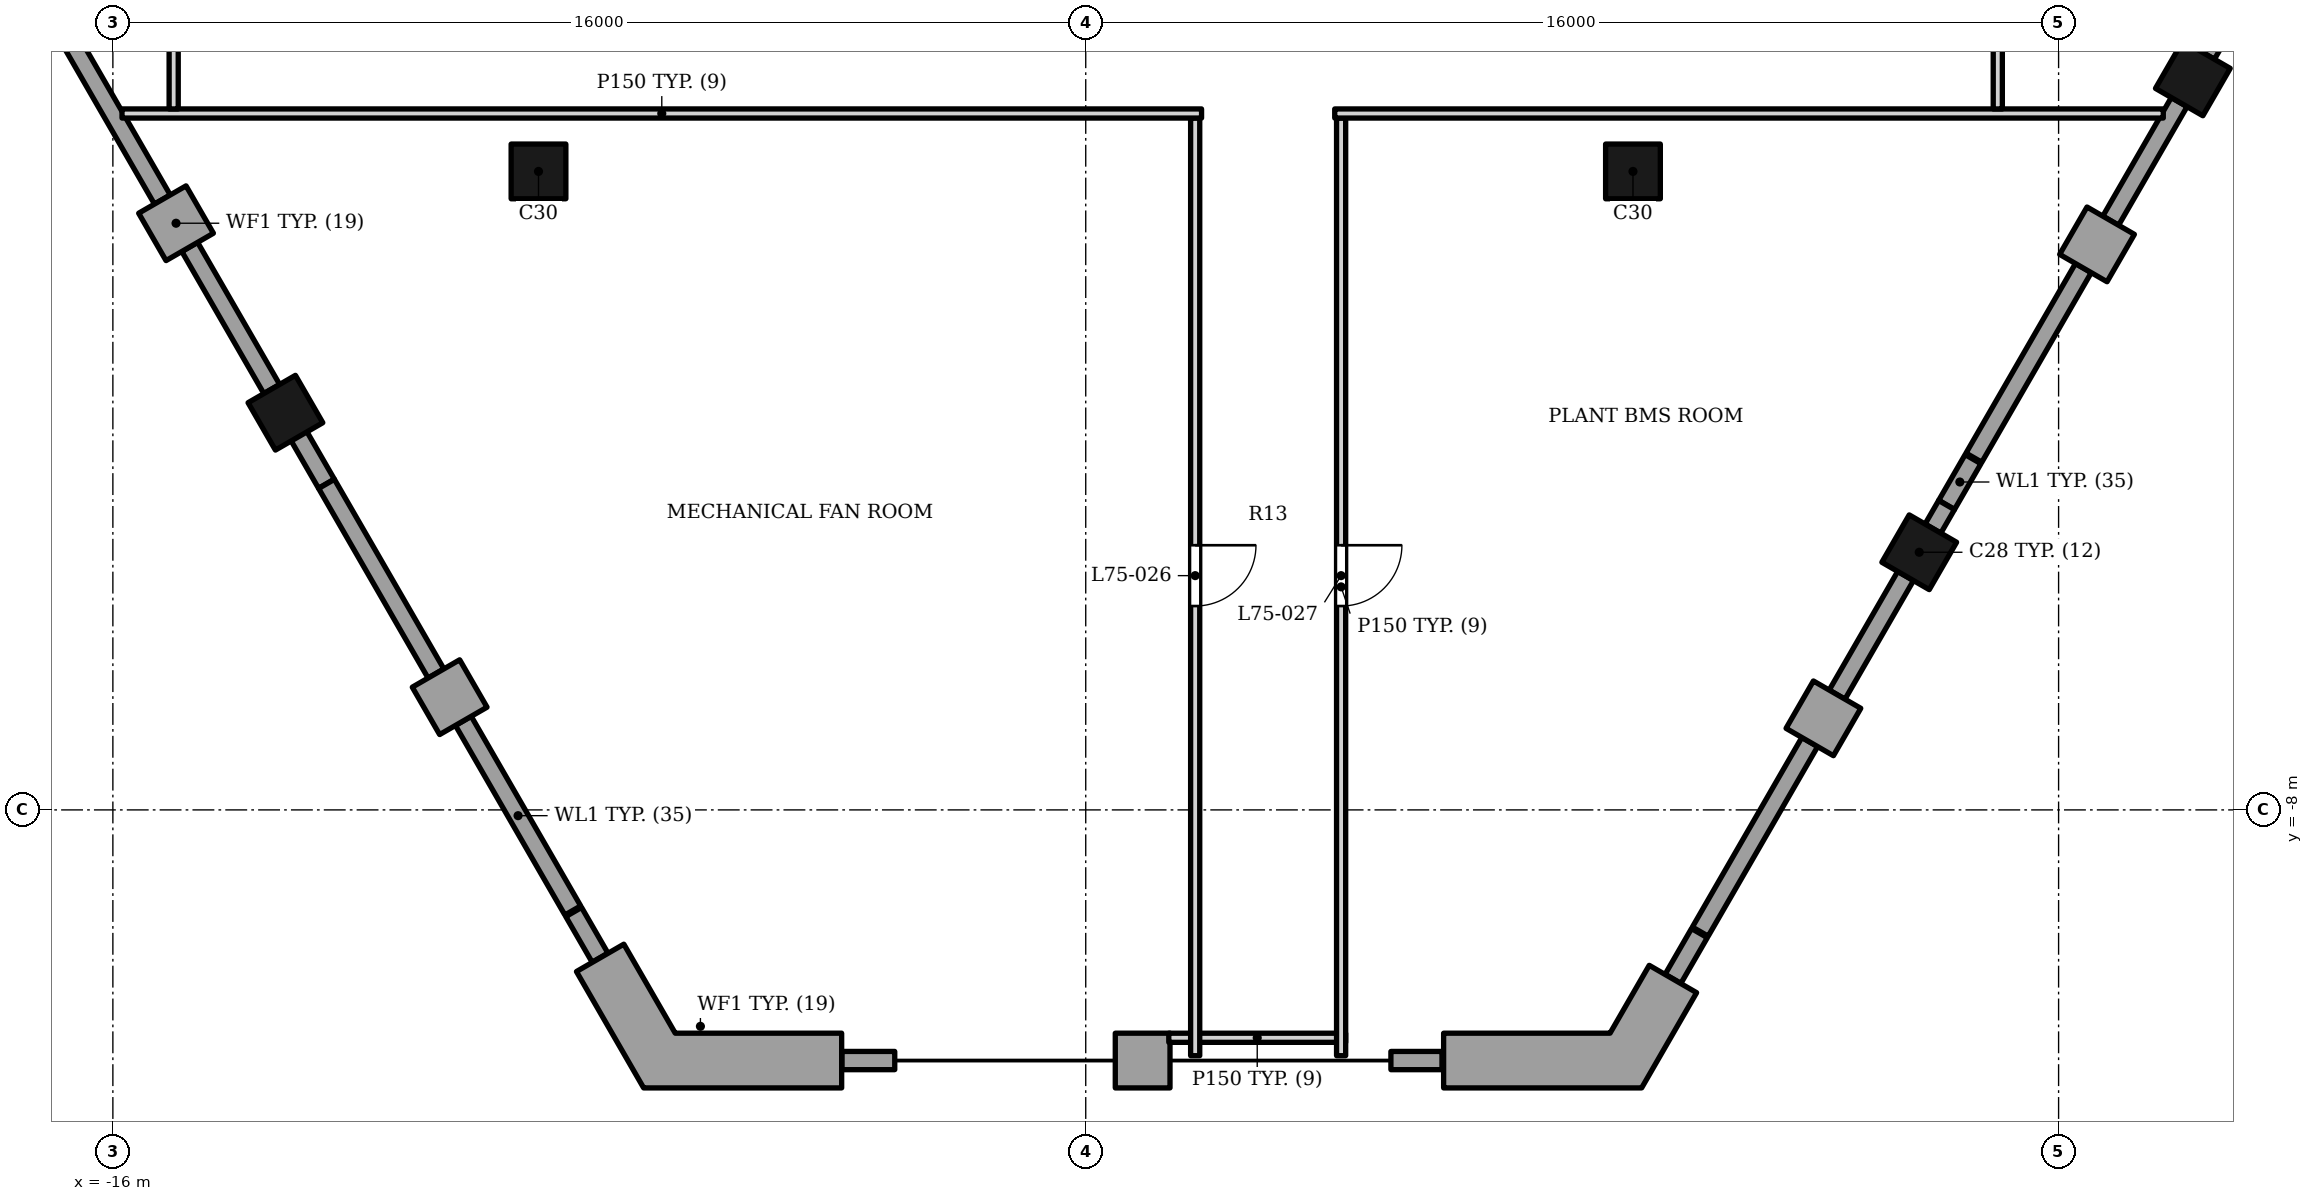
"""IFC4 building model, lengths in metres.
Left out: names, types, materials, properties, quantities, classifications, styles, units other than length and angle.
Written with IfcOpenShell. Run it as: python <this file> out.ifc"""

import sys

from ifc_helpers import new_model, si_unit, direction, frame, frame_2d, origin, origin_2d, place, context, subcontext, project, spatial, polyline, rectangle, outline, extrude, element, fill, save


model = new_model("IFC4")
c1 = context("Model", 3, precision=1e-05, world=origin(), true_north=direction((0.0, 1.0)))
c2 = subcontext(c1, "Body", "Model", "MODEL_VIEW")
j1 = project(units=[si_unit("LENGTHUNIT", "METRE"), si_unit("PLANEANGLEUNIT", "RADIAN")], contexts=[c1])
p1 = place(None, origin())
s1 = spatial("IfcSite", under=j1, at=p1, CompositionType="ELEMENT")
p2 = place(p1, origin())
s2 = spatial("IfcBuilding", under=s1, at=p2, CompositionType="ELEMENT")
p3 = place(p2, frame((0.0, 0.0, 320.5)))
s3 = spatial("IfcBuildingStorey", under=s2, at=p3, CompositionType="ELEMENT", Elevation=320.5)
for number, where, z_axis, x_axis in (
    (1, (-9.0, 2.5, 0.0), (0.0, 0.0, 1.0), (1.0, 0.0, 0.0)),
    (2, (9.0, 2.5, 0.0), (0.0, 0.0, 1.0), (1.0, 0.0, 0.0)),
    (3, (-13.162, -1.468, 0.0), (0.0, 0.0, 1.0), (0.5, -0.866, 0.0)),
    (4, (13.708, -3.763, 0.0), (0.0, 0.0, 1.0), (0.5, 0.866, 0.0)),
    (5, (18.208, 4.03, 0.0), (0.0, 0.0, 1.0), (0.5, 0.866, 0.0)),
):
    element("IfcColumn", number, at=place(p3, frame(where, z_axis=z_axis, x_axis=x_axis)), inside=s3, PredefinedType="COLUMN", context=c2, shape_type="SweptSolid", body=[
        extrude(rectangle(XDim=0.9, YDim=0.9, at=origin_2d()), origin(), (0.0, 0.0, 1.0), 5.0),
    ])
for number, where, z_axis, x_axis in (
    (6, (-15.351, 1.423, 0.0), (0.0, 0.0, 1.0), (0.866, 0.5, 0.0)),
    (7, (-10.851, -6.371, 0.0), (0.0, 0.0, 1.0), (0.866, 0.5, 0.0)),
):
    element("IfcWall", number, at=place(p3, frame(where, z_axis=z_axis, x_axis=x_axis)), inside=s3, PredefinedType="SOLIDWALL", context=c2, shape_type="SweptSolid", body=[
        extrude(rectangle(XDim=0.9, YDim=0.9, at=frame_2d((0.45, 0.0))), origin(), (0.0, 0.0, 1.0), 3.8),
    ])
p4 = place(p3, frame((-16.986, 5.156, 0.0), z_axis=(0.0, 0.0, 1.0), x_axis=(0.499982693035, -0.866035395735, 0.0)))
e8 = element("IfcWall", 8, at=p4, inside=s3, PredefinedType="ELEMENTEDWALL", context=c2, shape_type="SweptSolid", body=[
    extrude(rectangle(XDim=3.6, YDim=0.3, at=frame_2d((1.8, 0.0))), origin(), (0.0, 0.0, 1.0), 3.8),
])
p5 = place(p3, origin())
e9 = element("IfcWall", 9, at=p5, inside=s3, PredefinedType="ELEMENTEDWALL", context=c2, shape_type="SweptSolid", body=[
    extrude(outline(polyline([(-14.866, 1.183), (-13.517, -1.153), (-13.257, -1.003), (-14.606, 1.333), (-14.866, 1.183)])), origin(), (0.0, 0.0, 1.0), 3.8),
])
for number, where, z_axis, x_axis in (
    (10, (-12.486, -2.639, 0.0), (0.0, 0.0, 1.0), (0.5, -0.866, 0.0)),
    (11, (-10.236, -6.536, 0.0), (0.0, 0.0, 1.0), (0.5, -0.866, 0.0)),
):
    element("IfcWall", number, at=place(p3, frame(where, z_axis=z_axis, x_axis=x_axis)), inside=s3, PredefinedType="ELEMENTEDWALL", context=c2, shape_type="SweptSolid", body=[
        extrude(rectangle(XDim=3.6, YDim=0.3, at=frame_2d((1.8, 0.0))), origin(), (0.0, 0.0, 1.0), 3.8),
    ])
p6 = place(p3, origin())
e12 = element("IfcWall", 12, at=p6, inside=s3, PredefinedType="SOLIDWALL", context=c2, shape_type="SweptSolid", body=[
    extrude(outline(polyline([(1.386, -11.672), (0.486, -11.672), (0.486, -12.572), (1.386, -12.572), (1.386, -11.672)])), origin(), (0.0, 0.0, 1.0), 3.297),
])
for number, where, z_axis, x_axis in (
    (13, (11.907, -6.884, 0.0), (0.0, 0.0, 1.0), (0.5, 0.866, 0.0)),
    (14, (16.407, 0.91, 0.0), (0.0, 0.0, 1.0), (0.5, 0.866, 0.0)),
):
    element("IfcWall", number, at=place(p3, frame(where, z_axis=z_axis, x_axis=x_axis)), inside=s3, PredefinedType="SOLIDWALL", context=c2, shape_type="SweptSolid", body=[
        extrude(rectangle(XDim=0.9, YDim=0.9, at=frame_2d((0.45, 0.0))), origin(), (0.0, 0.0, 1.0), 3.8),
    ])
p7 = place(p3, frame((10.107, -10.001, 0.0), z_axis=(0.0, 0.0, 1.0), x_axis=(0.500012057535, 0.866018442252, 0.0)))
e15 = element("IfcWall", 15, at=p7, inside=s3, PredefinedType="ELEMENTEDWALL", context=c2, shape_type="SweptSolid", body=[
    extrude(rectangle(XDim=3.6, YDim=0.3, at=frame_2d((1.8, 0.0))), origin(), (0.0, 0.0, 1.0), 3.8),
])
p8 = place(p3, origin())
e16 = element("IfcWall", 16, at=p8, inside=s3, PredefinedType="ELEMENTEDWALL", context=c2, shape_type="SweptSolid", body=[
    extrude(outline(polyline([(12.487, -6.179), (13.614, -4.228), (13.354, -4.078), (12.227, -6.029), (12.487, -6.179)])), origin(), (0.0, 0.0, 1.0), 3.8),
])
p9 = place(p3, origin())
e17 = element("IfcWall", 17, at=p9, inside=s3, PredefinedType="ELEMENTEDWALL", context=c2, shape_type="SweptSolid", body=[
    extrude(outline(polyline([(14.027, -2.912), (13.804, -3.299), (14.063, -3.449), (14.287, -3.062), (14.027, -2.912)])), origin(), (0.0, 0.0, 1.0), 3.8),
])
p10 = place(p3, frame((14.607, -2.207, 0.0), z_axis=(0.0, 0.0, 1.0), x_axis=(0.500012057535, 0.866018442252, 0.0)))
e18 = element("IfcWall", 18, at=p10, inside=s3, PredefinedType="ELEMENTEDWALL", context=c2, shape_type="SweptSolid", body=[
    extrude(rectangle(XDim=3.6, YDim=0.3, at=frame_2d((1.8, 0.0))), origin(), (0.0, 0.0, 1.0), 3.8),
])
p11 = place(p3, origin())
e19 = element("IfcWall", 19, at=p11, inside=s3, PredefinedType="ELEMENTEDWALL", context=c2, shape_type="SweptSolid", body=[
    extrude(outline(polyline([(16.987, 1.615), (18.113, 3.565), (17.853, 3.715), (16.727, 1.765), (16.987, 1.615)])), origin(), (0.0, 0.0, 1.0), 3.8),
])
p12 = place(p3, origin())
e20 = element("IfcWall", 20, at=p12, inside=s3, PredefinedType="ELEMENTEDWALL", context=c2, shape_type="SweptSolid", body=[
    extrude(outline(polyline([(18.527, 4.883), (18.303, 4.495), (18.563, 4.345), (18.787, 4.733), (18.527, 4.883)])), origin(), (0.0, 0.0, 1.0), 3.8),
])
p13 = place(p3, origin())
e21 = element("IfcWall", 21, at=p13, inside=s3, PredefinedType="SOLIDWALL", context=c2, shape_type="SweptSolid", body=[
    extrude(outline(polyline([(-7.596, -10.208), (-8.376, -10.658), (-7.271, -12.572), (-4.014, -12.572), (-4.014, -11.672), (-6.751, -11.672), (-7.596, -10.208)])), origin(), (0.0, 0.0, 1.0), 3.297),
])
p14 = place(p3, origin())
e22 = element("IfcWall", 22, at=p14, inside=s3, PredefinedType="SOLIDWALL", context=c2, shape_type="SweptSolid", body=[
    extrude(outline(polyline([(5.886, -11.672), (5.886, -12.572), (9.143, -12.572), (10.047, -11.006), (9.267, -10.556), (8.623, -11.672), (5.886, -11.672)])), origin(), (0.0, 0.0, 1.0), 3.297),
])
p15 = place(p3, frame((-12.488, -2.635, 0.0), z_axis=(0.0, 0.0, 1.0), x_axis=(-0.500079715141, 0.865979375335, 0.0)))
e23 = element("IfcWall", 23, at=p15, inside=s3, PredefinedType="ELEMENTEDWALL", context=c2, shape_type="SweptSolid", body=[
    extrude(rectangle(XDim=0.966, YDim=0.3, at=frame_2d((0.483, 0.0))), origin(), (0.0, 0.0, 1.0), 3.8),
])
p16 = place(p3, frame((-7.988, -10.43, 0.0), z_axis=(0.0, 0.0, 1.0), x_axis=(-0.499958279983, 0.866049489508, 0.0)))
e24 = element("IfcWall", 24, at=p16, inside=s3, PredefinedType="ELEMENTEDWALL", context=c2, shape_type="SweptSolid", body=[
    extrude(rectangle(XDim=0.866, YDim=0.3, at=frame_2d((0.433, 0.0))), origin(), (0.0, 0.0, 1.0), 3.8),
])
p17 = place(p3, frame((-4.01, -12.122, 0.0), z_axis=(0.0, 0.0, 1.0), x_axis=(1.0, 0.0, 0.0)))
e25 = element("IfcWall", 25, at=p17, inside=s3, PredefinedType="ELEMENTEDWALL", context=c2, shape_type="SweptSolid", body=[
    extrude(rectangle(XDim=0.869, YDim=0.3, at=frame_2d((0.435, 0.0))), origin(), (0.0, 0.0, 1.0), 3.279),
])
p18 = place(p3, frame((5.019, -12.122, 0.0), z_axis=(0.0, 0.0, 1.0), x_axis=(1.0, 0.0, 0.0)))
e26 = element("IfcWall", 26, at=p18, inside=s3, PredefinedType="ELEMENTEDWALL", context=c2, shape_type="SweptSolid", body=[
    extrude(rectangle(XDim=0.84, YDim=0.3, at=frame_2d((0.42, 0.0))), origin(), (0.0, 0.0, 1.0), 3.279),
])
for number, where, z_axis, x_axis in (
    (27, (9.659, -10.777, 0.0), (0.0, 0.0, 1.0), (0.5, 0.866, 0.0)),
    (28, (14.159, -2.983, 0.0), (0.0, 0.0, 1.0), (0.5, 0.866, 0.0)),
):
    element("IfcWall", number, at=place(p3, frame(where, z_axis=z_axis, x_axis=x_axis)), inside=s3, PredefinedType="ELEMENTEDWALL", context=c2, shape_type="SweptSolid", body=[
        extrude(rectangle(XDim=0.867, YDim=0.3, at=frame_2d((0.434, 0.0))), origin(), (0.0, 0.0, 1.0), 3.8),
    ])
p19 = place(p3, frame((1.366, -11.747, 0.0), z_axis=(0.0, 0.0, 1.0), x_axis=(1.0, 0.0, 0.0)))
e29 = element("IfcWall", 29, at=p19, inside=s3, PredefinedType="PARTITIONING", context=c2, shape_type="SweptSolid", body=[
    extrude(rectangle(XDim=2.909, YDim=0.15, at=frame_2d((1.455, 0.0))), origin(), (0.0, 0.0, 1.0), 3.926),
])
p20 = place(p3, frame((1.8, -12.042, 0.0), z_axis=(0.0, 0.0, 1.0), x_axis=(0.0, 1.0, 0.0)))
e30 = element("IfcWall", 30, at=p20, inside=s3, PredefinedType="PARTITIONING", context=c2, shape_type="SweptSolid", body=[
    extrude(outline(polyline([(0.0, 0.0), (15.42, 0.0), (15.42, 4.8), (1.261, 4.8), (0.0, 3.742), (0.0, 0.0)])), frame((0.0, 0.075, 0.0), z_axis=(0.0, -1.0, 0.0), x_axis=(1.0, 0.0, 0.0)), (0.0, 0.0, 1.0), 0.15),
])
p21 = place(p20, frame((7.395, 0.0, 0.0)))
e31 = element("IfcOpeningElement", 31, at=p21, cuts=e30, PredefinedType="OPENING", context=c2, shape_type="SweptSolid", body=[
    extrude(rectangle(XDim=1.0, YDim=2.1, at=frame_2d((0.5, 1.05))), frame((0.0, 0.085, 0.0), z_axis=(0.0, -1.0, 0.0), x_axis=(1.0, 0.0, 0.0)), (0.0, 0.0, 1.0), 0.17),
])
p22 = place(p3, frame((4.2, -12.042, 0.0), z_axis=(0.0, 0.0, 1.0), x_axis=(0.0, 1.0, 0.0)))
e32 = element("IfcWall", 32, at=p22, inside=s3, PredefinedType="PARTITIONING", context=c2, shape_type="SweptSolid", body=[
    extrude(outline(polyline([(0.0, 0.0), (15.42, 0.0), (15.42, 4.8), (1.261, 4.8), (0.0, 3.742), (0.0, 0.0)])), frame((0.0, 0.075, 0.0), z_axis=(0.0, -1.0, 0.0), x_axis=(1.0, 0.0, 0.0)), (0.0, 0.0, 1.0), 0.15),
])
p23 = place(p22, frame((7.395, 0.0, 0.0)))
e33 = element("IfcOpeningElement", 33, at=p23, cuts=e32, PredefinedType="OPENING", context=c2, shape_type="SweptSolid", body=[
    extrude(rectangle(XDim=1.0, YDim=2.1, at=frame_2d((0.5, 1.05))), frame((0.0, 0.085, 0.0), z_axis=(0.0, -1.0, 0.0), x_axis=(1.0, 0.0, 0.0)), (0.0, 0.0, 1.0), 0.17),
])
p24 = place(p3, frame((-15.85, 3.453, 0.0), z_axis=(0.0, 0.0, 1.0), x_axis=(1.0, 0.0, 0.0)))
e34 = element("IfcWall", 34, at=p24, inside=s3, PredefinedType="PARTITIONING", context=c2, shape_type="SweptSolid", body=[
    extrude(rectangle(XDim=17.755, YDim=0.15, at=frame_2d((8.877, 0.0))), origin(), (0.0, 0.0, 1.0), 4.402),
])
p25 = place(p3, frame((4.095, 3.453, 0.0), z_axis=(0.0, 0.0, 1.0), x_axis=(1.0, 0.0, 0.0)))
e35 = element("IfcWall", 35, at=p25, inside=s3, PredefinedType="PARTITIONING", context=c2, shape_type="SweptSolid", body=[
    extrude(rectangle(XDim=13.627, YDim=0.15, at=frame_2d((6.813, 0.0))), origin(), (0.0, 0.0, 1.0), 4.352),
])
p26 = place(p3, frame((-15.0, 3.528, 0.0), z_axis=(0.0, 0.0, 1.0), x_axis=(0.0, 1.0, 0.0)))
e36 = element("IfcWall", 36, at=p26, inside=s3, PredefinedType="PARTITIONING", context=c2, shape_type="SweptSolid", body=[
    extrude(rectangle(XDim=15.395, YDim=0.15, at=frame_2d((7.698, 0.0))), origin(), (0.0, 0.0, 1.0), 4.02),
])
p27 = place(p26, frame((7.275, 0.0, 0.0)))
e37 = element("IfcOpeningElement", 37, at=p27, cuts=e36, PredefinedType="OPENING", context=c2, shape_type="SweptSolid", body=[
    extrude(rectangle(XDim=1.0, YDim=2.1, at=frame_2d((0.5, 1.05))), frame((0.0, 0.085, 0.0), z_axis=(0.0, -1.0, 0.0), x_axis=(1.0, 0.0, 0.0)), (0.0, 0.0, 1.0), 0.17),
])
p28 = place(p3, frame((15.0, 3.528, 0.0), z_axis=(0.0, 0.0, 1.0), x_axis=(0.0, 1.0, 0.0)))
e38 = element("IfcWall", 38, at=p28, inside=s3, PredefinedType="PARTITIONING", context=c2, shape_type="SweptSolid", body=[
    extrude(rectangle(XDim=15.83, YDim=0.15, at=frame_2d((7.915, 0.0))), origin(), (0.0, 0.0, 1.0), 4.02),
])
p29 = place(p28, frame((7.392, 0.0, 0.0)))
e39 = element("IfcOpeningElement", 39, at=p29, cuts=e38, PredefinedType="OPENING", context=c2, shape_type="SweptSolid", body=[
    extrude(rectangle(XDim=1.0, YDim=2.1, at=frame_2d((0.5, 1.05))), frame((0.0, 0.085, 0.0), z_axis=(0.0, -1.0, 0.0), x_axis=(1.0, 0.0, 0.0)), (0.0, 0.0, 1.0), 0.17),
])
p30 = place(p21, origin())
e40 = element("IfcDoor", 40, at=p30, inside=s3, OperationType="SINGLE_SWING_RIGHT", PredefinedType="DOOR", context=c2, shape_type="SweptSolid", body=[
    extrude(rectangle(XDim=1.0, YDim=2.1, at=frame_2d((0.5, 1.05))), frame((0.0, 0.025, 0.0), z_axis=(0.0, -1.0, 0.0), x_axis=(1.0, 0.0, 0.0)), (0.0, 0.0, 1.0), 0.05),
])
fill(e31, e40)
p31 = place(p23, origin())
e41 = element("IfcDoor", 41, at=p31, inside=s3, OperationType="SINGLE_SWING_RIGHT", PredefinedType="DOOR", context=c2, shape_type="SweptSolid", body=[
    extrude(rectangle(XDim=1.0, YDim=2.1, at=frame_2d((0.5, 1.05))), frame((0.0, 0.025, 0.0), z_axis=(0.0, -1.0, 0.0), x_axis=(1.0, 0.0, 0.0)), (0.0, 0.0, 1.0), 0.05),
])
fill(e33, e41)
save(model, sys.argv[1])
